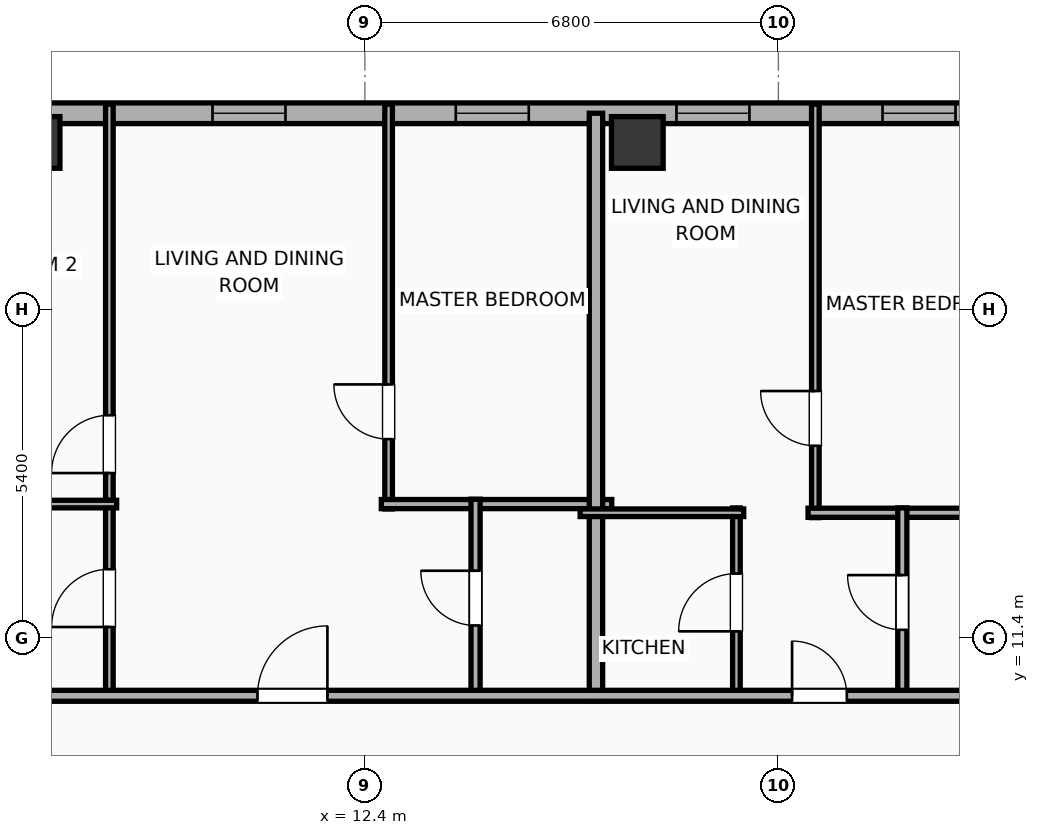
"""IFC4 building model, lengths in metres.
Left out: names, types, materials, properties, quantities, classifications, styles, units other than length and angle.
Written with IfcOpenShell. Run it as: python <this file> out.ifc"""

import sys

from ifc_helpers import new_model, si_unit, direction, frame, frame_2d, origin, origin_2d, place, context, subcontext, project, spatial, rectangle, hollow_rectangle, extrude, element, fill, save


model = new_model("IFC4")
c1 = context("Model", 3, precision=1e-05, world=origin(), true_north=direction((0.0, 1.0)))
c2 = subcontext(c1, "Body", "Model", "MODEL_VIEW")
j1 = project(units=[si_unit("LENGTHUNIT", "METRE"), si_unit("PLANEANGLEUNIT", "RADIAN")], contexts=[c1])
p1 = place(None, origin())
s1 = spatial("IfcSite", under=j1, at=p1, CompositionType="ELEMENT")
p2 = place(p1, origin())
s2 = spatial("IfcBuilding", under=s1, at=p2, CompositionType="ELEMENT")
p3 = place(p2, frame((0.0, 0.0, 239.2)))
s3 = spatial("IfcBuildingStorey", under=s2, at=p3, CompositionType="ELEMENT", Elevation=239.2)
for number, where, z_axis, x_axis in (
    (1, (16.88, 19.55, 0.0), (0.0, 0.0, 1.0), (1.0, 0.0, 0.0)),
    (2, (6.96, 19.55, 0.0), (0.0, 0.0, 1.0), (1.0, 0.0, 0.0)),
):
    element("IfcColumn", number, at=place(p3, frame(where, z_axis=z_axis, x_axis=x_axis)), inside=s3, PredefinedType="COLUMN", context=c2, shape_type="SweptSolid", body=[
        extrude(hollow_rectangle(XDim=0.85, YDim=0.85, WallThickness=0.028, at=origin_2d()), origin(), (0.0, 0.0, 1.0), 3.9),
    ])
p4 = place(p3, frame((-22.783, 20.03, 0.0), z_axis=(0.0, 0.0, 1.0), x_axis=(1.0, 0.0, 0.0)))
e3 = element("IfcWall", 3, at=p4, inside=s3, PredefinedType="ELEMENTEDWALL", context=c2, shape_type="SweptSolid", body=[
    extrude(rectangle(XDim=49.566, YDim=0.34, at=frame_2d((24.783, 0.0))), origin(), (0.0, 0.0, 1.0), 3.65),
])
p5 = place(p4, frame((6.211, 0.0, 0.75)))
e4 = element("IfcOpeningElement", 4, at=p5, cuts=e3, PredefinedType="OPENING", context=c2, shape_type="SweptSolid", body=[
    extrude(rectangle(XDim=2.4, YDim=2.1, at=frame_2d((1.2, 1.05))), frame((0.0, 0.18, 0.0), z_axis=(0.0, -1.0, 0.0), x_axis=(1.0, 0.0, 0.0)), (0.0, 0.0, 1.0), 0.36),
])
p6 = place(p4, frame((22.733, 0.0, 0.75)))
e5 = element("IfcOpeningElement", 5, at=p6, cuts=e3, PredefinedType="OPENING", context=c2, shape_type="SweptSolid", body=[
    extrude(rectangle(XDim=2.4, YDim=2.1, at=frame_2d((1.2, 1.05))), frame((0.0, 0.18, 0.0), z_axis=(0.0, -1.0, 0.0), x_axis=(1.0, 0.0, 0.0)), (0.0, 0.0, 1.0), 0.36),
])
p7 = place(p4, frame((1.132, 0.0, 0.75)))
e6 = element("IfcOpeningElement", 6, at=p7, cuts=e3, PredefinedType="OPENING", context=c2, shape_type="SweptSolid", body=[
    extrude(rectangle(XDim=1.2, YDim=2.05, at=frame_2d((0.6, 1.025))), frame((0.0, 0.18, 0.0), z_axis=(0.0, -1.0, 0.0), x_axis=(1.0, 0.0, 0.0)), (0.0, 0.0, 1.0), 0.36),
])
p8 = place(p4, frame((3.678, 0.0, 0.75)))
e7 = element("IfcOpeningElement", 7, at=p8, cuts=e3, PredefinedType="OPENING", context=c2, shape_type="SweptSolid", body=[
    extrude(rectangle(XDim=1.2, YDim=2.05, at=frame_2d((0.6, 1.025))), frame((0.0, 0.18, 0.0), z_axis=(0.0, -1.0, 0.0), x_axis=(1.0, 0.0, 0.0)), (0.0, 0.0, 1.0), 0.36),
])
p9 = place(p4, frame((14.804, 0.0, 0.75)))
e8 = element("IfcOpeningElement", 8, at=p9, cuts=e3, PredefinedType="OPENING", context=c2, shape_type="SweptSolid", body=[
    extrude(rectangle(XDim=1.2, YDim=2.05, at=frame_2d((0.6, 1.025))), frame((0.0, 0.18, 0.0), z_axis=(0.0, -1.0, 0.0), x_axis=(1.0, 0.0, 0.0)), (0.0, 0.0, 1.0), 0.36),
])
p10 = place(p4, frame((12.054, 0.0, 0.75)))
e9 = element("IfcOpeningElement", 9, at=p10, cuts=e3, PredefinedType="OPENING", context=c2, shape_type="SweptSolid", body=[
    extrude(rectangle(XDim=1.2, YDim=2.05, at=frame_2d((0.6, 1.025))), frame((0.0, 0.18, 0.0), z_axis=(0.0, -1.0, 0.0), x_axis=(1.0, 0.0, 0.0)), (0.0, 0.0, 1.0), 0.36),
])
p11 = place(p4, frame((17.933, 0.0, 0.75)))
e10 = element("IfcOpeningElement", 10, at=p11, cuts=e3, PredefinedType="OPENING", context=c2, shape_type="SweptSolid", body=[
    extrude(rectangle(XDim=1.2, YDim=2.05, at=frame_2d((0.6, 1.025))), frame((0.0, 0.18, 0.0), z_axis=(0.0, -1.0, 0.0), x_axis=(1.0, 0.0, 0.0)), (0.0, 0.0, 1.0), 0.36),
])
p12 = place(p4, frame((26.278, 0.0, 0.75)))
e11 = element("IfcOpeningElement", 11, at=p12, cuts=e3, PredefinedType="OPENING", context=c2, shape_type="SweptSolid", body=[
    extrude(rectangle(XDim=1.2, YDim=2.05, at=frame_2d((0.6, 1.025))), frame((0.0, 0.18, 0.0), z_axis=(0.0, -1.0, 0.0), x_axis=(1.0, 0.0, 0.0)), (0.0, 0.0, 1.0), 0.36),
])
p13 = place(p4, frame((32.677, 0.0, 0.75)))
e12 = element("IfcOpeningElement", 12, at=p13, cuts=e3, PredefinedType="OPENING", context=c2, shape_type="SweptSolid", body=[
    extrude(rectangle(XDim=1.2, YDim=2.05, at=frame_2d((0.6, 1.025))), frame((0.0, 0.18, 0.0), z_axis=(0.0, -1.0, 0.0), x_axis=(1.0, 0.0, 0.0)), (0.0, 0.0, 1.0), 0.36),
])
p14 = place(p4, frame((28.217, 0.0, 0.75)))
e13 = element("IfcOpeningElement", 13, at=p14, cuts=e3, PredefinedType="OPENING", context=c2, shape_type="SweptSolid", body=[
    extrude(rectangle(XDim=0.85, YDim=2.05, at=frame_2d((0.425, 1.025))), frame((0.0, 0.18, 0.0), z_axis=(0.0, -1.0, 0.0), x_axis=(1.0, 0.0, 0.0)), (0.0, 0.0, 1.0), 0.36),
])
p15 = place(p4, frame((36.678, 0.0, 0.75)))
e14 = element("IfcOpeningElement", 14, at=p15, cuts=e3, PredefinedType="OPENING", context=c2, shape_type="SweptSolid", body=[
    extrude(rectangle(XDim=1.2, YDim=2.05, at=frame_2d((0.6, 1.025))), frame((0.0, 0.18, 0.0), z_axis=(0.0, -1.0, 0.0), x_axis=(1.0, 0.0, 0.0)), (0.0, 0.0, 1.0), 0.36),
])
p16 = place(p4, frame((40.307, 0.0, 0.75)))
e15 = element("IfcOpeningElement", 15, at=p16, cuts=e3, PredefinedType="OPENING", context=c2, shape_type="SweptSolid", body=[
    extrude(rectangle(XDim=1.2, YDim=2.05, at=frame_2d((0.6, 1.025))), frame((0.0, 0.18, 0.0), z_axis=(0.0, -1.0, 0.0), x_axis=(1.0, 0.0, 0.0)), (0.0, 0.0, 1.0), 0.36),
])
p17 = place(p4, frame((43.696, 0.0, 0.75)))
e16 = element("IfcOpeningElement", 16, at=p17, cuts=e3, PredefinedType="OPENING", context=c2, shape_type="SweptSolid", body=[
    extrude(rectangle(XDim=1.2, YDim=2.05, at=frame_2d((0.6, 1.025))), frame((0.0, 0.18, 0.0), z_axis=(0.0, -1.0, 0.0), x_axis=(1.0, 0.0, 0.0)), (0.0, 0.0, 1.0), 0.36),
])
p18 = place(p4, frame((46.739, 0.0, 0.75)))
e17 = element("IfcOpeningElement", 17, at=p18, cuts=e3, PredefinedType="OPENING", context=c2, shape_type="SweptSolid", body=[
    extrude(rectangle(XDim=1.2, YDim=2.05, at=frame_2d((0.6, 1.025))), frame((0.0, 0.18, 0.0), z_axis=(0.0, -1.0, 0.0), x_axis=(1.0, 0.0, 0.0)), (0.0, 0.0, 1.0), 0.36),
])
p19 = place(p3, frame((8.198, 13.541, 0.0), z_axis=(0.0, 0.0, 1.0), x_axis=(0.0, 1.0, 0.0)))
e18 = element("IfcWall", 18, at=p19, inside=s3, PredefinedType="PARTITIONING", context=c2, shape_type="SweptSolid", body=[
    extrude(rectangle(XDim=6.639, YDim=0.125, at=frame_2d((3.32, 0.0))), origin(), (0.0, 0.0, 1.0), 3.65),
])
p20 = place(p19, frame((0.573, 0.0, 0.0)))
e19 = element("IfcOpeningElement", 19, at=p20, cuts=e18, PredefinedType="OPENING", context=c2, shape_type="SweptSolid", body=[
    extrude(rectangle(XDim=0.95, YDim=2.05, at=frame_2d((0.475, 1.025))), frame((0.0, 0.073, 0.0), z_axis=(0.0, -1.0, 0.0), x_axis=(1.0, 0.0, 0.0)), (0.0, 0.0, 1.0), 0.145),
])
p21 = place(p3, frame((12.79, 13.523, 0.0), z_axis=(0.0, 0.0, 1.0), x_axis=(0.0, 1.0, 0.0)))
e20 = element("IfcWall", 20, at=p21, inside=s3, PredefinedType="PARTITIONING", context=c2, shape_type="SweptSolid", body=[
    extrude(rectangle(XDim=6.657, YDim=0.125, at=frame_2d((3.329, 0.0))), origin(), (0.0, 0.0, 1.0), 3.65),
])
p22 = place(p21, frame((1.148, 0.0, 0.0)))
e21 = element("IfcOpeningElement", 21, at=p22, cuts=e20, PredefinedType="OPENING", context=c2, shape_type="SweptSolid", body=[
    extrude(rectangle(XDim=0.9, YDim=2.05, at=frame_2d((0.45, 1.025))), frame((0.0, 0.073, 0.0), z_axis=(0.0, -1.0, 0.0), x_axis=(1.0, 0.0, 0.0)), (0.0, 0.0, 1.0), 0.145),
])
p23 = place(p3, frame((12.67, 13.603, 0.0), z_axis=(0.0, 0.0, 1.0), x_axis=(1.0, 0.0, 0.0)))
e22 = element("IfcWall", 22, at=p23, inside=s3, PredefinedType="PLUMBINGWALL", context=c2, shape_type="SweptSolid", body=[
    extrude(rectangle(XDim=3.79, YDim=0.15, at=frame_2d((1.895, 0.0))), origin(), (0.0, 0.0, 1.0), 3.65),
])
p24 = place(p3, frame((8.198, 10.43, 0.0), z_axis=(0.0, 0.0, 1.0), x_axis=(0.0, 1.0, 0.0)))
e23 = element("IfcWall", 23, at=p24, inside=s3, PredefinedType="PARTITIONING", context=c2, shape_type="SweptSolid", body=[
    extrude(rectangle(XDim=3.236, YDim=0.125, at=frame_2d((1.618, 0.0))), origin(), (0.0, 0.0, 1.0), 3.65),
])
p25 = place(p24, frame((1.152, 0.0, 0.0)))
e24 = element("IfcOpeningElement", 24, at=p25, cuts=e23, PredefinedType="OPENING", context=c2, shape_type="SweptSolid", body=[
    extrude(rectangle(XDim=0.95, YDim=2.05, at=frame_2d((0.475, 1.025))), frame((0.0, 0.073, 0.0), z_axis=(0.0, -1.0, 0.0), x_axis=(1.0, 0.0, 0.0)), (0.0, 0.0, 1.0), 0.145),
])
p26 = place(p3, frame((4.94, 13.603, 0.0), z_axis=(0.0, 0.0, 1.0), x_axis=(1.0, 0.0, 0.0)))
e25 = element("IfcWall", 25, at=p26, inside=s3, PredefinedType="PARTITIONING", context=c2, shape_type="SweptSolid", body=[
    extrude(rectangle(XDim=3.378, YDim=0.125, at=frame_2d((1.689, 0.0))), origin(), (0.0, 0.0, 1.0), 3.65),
])
p27 = place(p3, frame((14.22, 10.43, 0.0), z_axis=(0.0, 0.0, 1.0), x_axis=(0.0, 1.0, 0.0)))
e26 = element("IfcWall", 26, at=p27, inside=s3, PredefinedType="PLUMBINGWALL", context=c2, shape_type="SweptSolid", body=[
    extrude(rectangle(XDim=3.253, YDim=0.15, at=frame_2d((1.626, 0.0))), origin(), (0.0, 0.0, 1.0), 3.65),
])
p28 = place(p27, frame((1.177, 0.0, 0.0)))
e27 = element("IfcOpeningElement", 27, at=p28, cuts=e26, PredefinedType="OPENING", context=c2, shape_type="SweptSolid", body=[
    extrude(rectangle(XDim=0.9, YDim=2.05, at=frame_2d((0.45, 1.025))), frame((0.0, 0.085, 0.0), z_axis=(0.0, -1.0, 0.0), x_axis=(1.0, 0.0, 0.0)), (0.0, 0.0, 1.0), 0.17),
])
p29 = place(p3, frame((16.2, 10.37, 0.0), z_axis=(0.0, 0.0, 1.0), x_axis=(0.0, 1.0, 0.0)))
e28 = element("IfcWall", 28, at=p29, inside=s3, PredefinedType="PARTITIONING", context=c2, shape_type="SweptSolid", body=[
    extrude(rectangle(XDim=9.66, YDim=0.22, at=frame_2d((4.83, 0.0))), origin(), (0.0, 0.0, 1.0), 3.09),
])
p30 = place(p3, frame((19.808, 13.38, 0.0), z_axis=(0.0, 0.0, 1.0), x_axis=(0.0, 1.0, 0.0)))
e29 = element("IfcWall", 29, at=p30, inside=s3, PredefinedType="PARTITIONING", context=c2, shape_type="SweptSolid", body=[
    extrude(rectangle(XDim=6.8, YDim=0.125, at=frame_2d((3.4, 0.0))), origin(), (0.0, 0.0, 1.0), 3.65),
])
p31 = place(p30, frame((1.182, 0.0, 0.0)))
e30 = element("IfcOpeningElement", 30, at=p31, cuts=e29, PredefinedType="OPENING", context=c2, shape_type="SweptSolid", body=[
    extrude(rectangle(XDim=0.9, YDim=2.05, at=frame_2d((0.45, 1.025))), frame((0.0, 0.073, 0.0), z_axis=(0.0, -1.0, 0.0), x_axis=(1.0, 0.0, 0.0)), (0.0, 0.0, 1.0), 0.145),
])
p32 = place(p3, frame((19.688, 13.46, 0.0), z_axis=(0.0, 0.0, 1.0), x_axis=(1.0, 0.0, 0.0)))
e31 = element("IfcWall", 31, at=p32, inside=s3, PredefinedType="PLUMBINGWALL", context=c2, shape_type="SweptSolid", body=[
    extrude(rectangle(XDim=3.79, YDim=0.15, at=frame_2d((1.895, 0.0))), origin(), (0.0, 0.0, 1.0), 3.65),
])
p33 = place(p3, frame((18.51, 10.43, 0.0), z_axis=(0.0, 0.0, 1.0), x_axis=(0.0, 1.0, 0.0)))
e32 = element("IfcWall", 32, at=p33, inside=s3, PredefinedType="PARTITIONING", context=c2, shape_type="SweptSolid", body=[
    extrude(rectangle(XDim=3.11, YDim=0.125, at=frame_2d((1.555, 0.0))), origin(), (0.0, 0.0, 1.0), 3.65),
])
p34 = place(p33, frame((1.08, 0.0, 0.0)))
e33 = element("IfcOpeningElement", 33, at=p34, cuts=e32, PredefinedType="OPENING", context=c2, shape_type="SweptSolid", body=[
    extrude(rectangle(XDim=0.95, YDim=2.05, at=frame_2d((0.475, 1.025))), frame((0.0, 0.073, 0.0), z_axis=(0.0, -1.0, 0.0), x_axis=(1.0, 0.0, 0.0)), (0.0, 0.0, 1.0), 0.145),
])
p35 = place(p3, frame((15.94, 13.46, 0.0), z_axis=(0.0, 0.0, 1.0), x_axis=(1.0, 0.0, 0.0)))
e34 = element("IfcWall", 34, at=p35, inside=s3, PredefinedType="PARTITIONING", context=c2, shape_type="SweptSolid", body=[
    extrude(rectangle(XDim=2.69, YDim=0.125, at=frame_2d((1.345, 0.0))), origin(), (0.0, 0.0, 1.0), 3.65),
])
p36 = place(p3, frame((21.238, 10.43, 0.0), z_axis=(0.0, 0.0, 1.0), x_axis=(0.0, 1.0, 0.0)))
e35 = element("IfcWall", 35, at=p36, inside=s3, PredefinedType="PLUMBINGWALL", context=c2, shape_type="SweptSolid", body=[
    extrude(rectangle(XDim=3.11, YDim=0.15, at=frame_2d((1.555, 0.0))), origin(), (0.0, 0.0, 1.0), 3.65),
])
p37 = place(p36, frame((1.105, 0.0, 0.0)))
e36 = element("IfcOpeningElement", 36, at=p37, cuts=e35, PredefinedType="OPENING", context=c2, shape_type="SweptSolid", body=[
    extrude(rectangle(XDim=0.9, YDim=2.05, at=frame_2d((0.45, 1.025))), frame((0.0, 0.085, 0.0), z_axis=(0.0, -1.0, 0.0), x_axis=(1.0, 0.0, 0.0)), (0.0, 0.0, 1.0), 0.17),
])
p38 = place(p3, frame((-26.23, 10.45, 0.0), z_axis=(0.0, 0.0, 1.0), x_axis=(1.0, 0.0, 0.0)))
e37 = element("IfcWall", 37, at=p38, inside=s3, PredefinedType="PARTITIONING", context=c2, shape_type="SweptSolid", body=[
    extrude(rectangle(XDim=56.46, YDim=0.18, at=frame_2d((28.23, 0.0))), origin(), (0.0, 0.0, 1.0), 3.65),
])
p39 = place(p38, frame((4.41, 0.0, 0.0)))
e38 = element("IfcOpeningElement", 38, at=p39, cuts=e37, PredefinedType="OPENING", context=c2, shape_type="SweptSolid", body=[
    extrude(rectangle(XDim=1.15, YDim=2.05, at=frame_2d((0.575, 1.025))), frame((0.0, 0.1, 0.0), z_axis=(0.0, -1.0, 0.0), x_axis=(1.0, 0.0, 0.0)), (0.0, 0.0, 1.0), 0.2),
])
p40 = place(p38, frame((11.943, 0.0, 0.0)))
e39 = element("IfcOpeningElement", 39, at=p40, cuts=e37, PredefinedType="OPENING", context=c2, shape_type="SweptSolid", body=[
    extrude(rectangle(XDim=0.9, YDim=2.05, at=frame_2d((0.45, 1.025))), frame((0.0, 0.1, 0.0), z_axis=(0.0, -1.0, 0.0), x_axis=(1.0, 0.0, 0.0)), (0.0, 0.0, 1.0), 0.2),
])
p41 = place(p38, frame((18.243, 0.0, 0.0)))
e40 = element("IfcOpeningElement", 40, at=p41, cuts=e37, PredefinedType="OPENING", context=c2, shape_type="SweptSolid", body=[
    extrude(rectangle(XDim=1.15, YDim=2.05, at=frame_2d((0.575, 1.025))), frame((0.0, 0.1, 0.0), z_axis=(0.0, -1.0, 0.0), x_axis=(1.0, 0.0, 0.0)), (0.0, 0.0, 1.0), 0.2),
])
p42 = place(p38, frame((22.941, 0.0, 0.0)))
e41 = element("IfcOpeningElement", 41, at=p42, cuts=e37, PredefinedType="OPENING", context=c2, shape_type="SweptSolid", body=[
    extrude(rectangle(XDim=0.9, YDim=2.05, at=frame_2d((0.45, 1.025))), frame((0.0, 0.1, 0.0), z_axis=(0.0, -1.0, 0.0), x_axis=(1.0, 0.0, 0.0)), (0.0, 0.0, 1.0), 0.2),
])
p43 = place(p38, frame((27.028, 0.0, 0.0)))
e42 = element("IfcOpeningElement", 42, at=p43, cuts=e37, PredefinedType="OPENING", context=c2, shape_type="SweptSolid", body=[
    extrude(rectangle(XDim=1.15, YDim=2.05, at=frame_2d((0.575, 1.025))), frame((0.0, 0.1, 0.0), z_axis=(0.0, -1.0, 0.0), x_axis=(1.0, 0.0, 0.0)), (0.0, 0.0, 1.0), 0.2),
])
p44 = place(p38, frame((36.864, 0.0, 0.0)))
e43 = element("IfcOpeningElement", 43, at=p44, cuts=e37, PredefinedType="OPENING", context=c2, shape_type="SweptSolid", body=[
    extrude(rectangle(XDim=1.15, YDim=2.05, at=frame_2d((0.575, 1.025))), frame((0.0, 0.1, 0.0), z_axis=(0.0, -1.0, 0.0), x_axis=(1.0, 0.0, 0.0)), (0.0, 0.0, 1.0), 0.2),
])
p45 = place(p38, frame((45.655, 0.0, 0.0)))
e44 = element("IfcOpeningElement", 44, at=p45, cuts=e37, PredefinedType="OPENING", context=c2, shape_type="SweptSolid", body=[
    extrude(rectangle(XDim=0.9, YDim=2.05, at=frame_2d((0.45, 1.025))), frame((0.0, 0.1, 0.0), z_axis=(0.0, -1.0, 0.0), x_axis=(1.0, 0.0, 0.0)), (0.0, 0.0, 1.0), 0.2),
])
p46 = place(p38, frame((52.576, 0.0, 0.0)))
e45 = element("IfcOpeningElement", 45, at=p46, cuts=e37, PredefinedType="OPENING", context=c2, shape_type="SweptSolid", body=[
    extrude(rectangle(XDim=1.15, YDim=2.05, at=frame_2d((0.575, 1.025))), frame((0.0, 0.1, 0.0), z_axis=(0.0, -1.0, 0.0), x_axis=(1.0, 0.0, 0.0)), (0.0, 0.0, 1.0), 0.2),
])
p47 = place(p13, origin())
e46 = element("IfcWindow", 46, at=p47, inside=s3, PartitioningType="SINGLE_PANEL", PredefinedType="WINDOW", context=c2, shape_type="SweptSolid", body=[
    extrude(rectangle(XDim=1.2, YDim=2.05, at=frame_2d((0.6, 1.025))), frame((0.0, 0.03, 0.0), z_axis=(0.0, -1.0, 0.0), x_axis=(1.0, 0.0, 0.0)), (0.0, 0.0, 1.0), 0.06),
])
fill(e12, e46)
p48 = place(p15, origin())
e47 = element("IfcWindow", 47, at=p48, inside=s3, PartitioningType="SINGLE_PANEL", PredefinedType="WINDOW", context=c2, shape_type="SweptSolid", body=[
    extrude(rectangle(XDim=1.2, YDim=2.05, at=frame_2d((0.6, 1.025))), frame((0.0, 0.03, 0.0), z_axis=(0.0, -1.0, 0.0), x_axis=(1.0, 0.0, 0.0)), (0.0, 0.0, 1.0), 0.06),
])
fill(e14, e47)
p49 = place(p16, origin())
e48 = element("IfcWindow", 48, at=p49, inside=s3, PartitioningType="SINGLE_PANEL", PredefinedType="WINDOW", context=c2, shape_type="SweptSolid", body=[
    extrude(rectangle(XDim=1.2, YDim=2.05, at=frame_2d((0.6, 1.025))), frame((0.0, 0.03, 0.0), z_axis=(0.0, -1.0, 0.0), x_axis=(1.0, 0.0, 0.0)), (0.0, 0.0, 1.0), 0.06),
])
fill(e15, e48)
p50 = place(p17, origin())
e49 = element("IfcWindow", 49, at=p50, inside=s3, PartitioningType="SINGLE_PANEL", PredefinedType="WINDOW", context=c2, shape_type="SweptSolid", body=[
    extrude(rectangle(XDim=1.2, YDim=2.05, at=frame_2d((0.6, 1.025))), frame((0.0, 0.03, 0.0), z_axis=(0.0, -1.0, 0.0), x_axis=(1.0, 0.0, 0.0)), (0.0, 0.0, 1.0), 0.06),
])
fill(e16, e49)
p51 = place(p20, origin())
e50 = element("IfcDoor", 50, at=p51, inside=s3, OperationType="SINGLE_SWING_LEFT", PredefinedType="DOOR", context=c2, shape_type="SweptSolid", body=[
    extrude(rectangle(XDim=0.95, YDim=2.05, at=frame_2d((0.475, 1.025))), frame((0.0, 0.025, 0.0), z_axis=(0.0, -1.0, 0.0), x_axis=(1.0, 0.0, 0.0)), (0.0, 0.0, 1.0), 0.05),
])
fill(e19, e50)
p52 = place(p22, origin())
e51 = element("IfcDoor", 51, at=p52, inside=s3, OperationType="SINGLE_SWING_RIGHT", PredefinedType="DOOR", context=c2, shape_type="SweptSolid", body=[
    extrude(rectangle(XDim=0.9, YDim=2.05, at=frame_2d((0.45, 1.025))), frame((0.0, 0.025, 0.0), z_axis=(0.0, -1.0, 0.0), x_axis=(1.0, 0.0, 0.0)), (0.0, 0.0, 1.0), 0.05),
])
fill(e21, e51)
p53 = place(p25, origin())
e52 = element("IfcDoor", 52, at=p53, inside=s3, OperationType="SINGLE_SWING_LEFT", PredefinedType="DOOR", context=c2, shape_type="SweptSolid", body=[
    extrude(rectangle(XDim=0.95, YDim=2.05, at=frame_2d((0.475, 1.025))), frame((0.0, 0.025, 0.0), z_axis=(0.0, -1.0, 0.0), x_axis=(1.0, 0.0, 0.0)), (0.0, 0.0, 1.0), 0.05),
])
fill(e24, e52)
p54 = place(p28, origin())
e53 = element("IfcDoor", 53, at=p54, inside=s3, OperationType="SINGLE_SWING_RIGHT", PredefinedType="DOOR", context=c2, shape_type="SweptSolid", body=[
    extrude(rectangle(XDim=0.9, YDim=2.05, at=frame_2d((0.45, 1.025))), frame((0.0, 0.025, 0.0), z_axis=(0.0, -1.0, 0.0), x_axis=(1.0, 0.0, 0.0)), (0.0, 0.0, 1.0), 0.05),
])
fill(e27, e53)
p55 = place(p31, origin())
e54 = element("IfcDoor", 54, at=p55, inside=s3, OperationType="SINGLE_SWING_RIGHT", PredefinedType="DOOR", context=c2, shape_type="SweptSolid", body=[
    extrude(rectangle(XDim=0.9, YDim=2.05, at=frame_2d((0.45, 1.025))), frame((0.0, 0.025, 0.0), z_axis=(0.0, -1.0, 0.0), x_axis=(1.0, 0.0, 0.0)), (0.0, 0.0, 1.0), 0.05),
])
fill(e30, e54)
p56 = place(p34, origin())
e55 = element("IfcDoor", 55, at=p56, inside=s3, OperationType="SINGLE_SWING_LEFT", PredefinedType="DOOR", context=c2, shape_type="SweptSolid", body=[
    extrude(rectangle(XDim=0.95, YDim=2.05, at=frame_2d((0.475, 1.025))), frame((0.0, 0.025, 0.0), z_axis=(0.0, -1.0, 0.0), x_axis=(1.0, 0.0, 0.0)), (0.0, 0.0, 1.0), 0.05),
])
fill(e33, e55)
p57 = place(p37, origin())
e56 = element("IfcDoor", 56, at=p57, inside=s3, OperationType="SINGLE_SWING_RIGHT", PredefinedType="DOOR", context=c2, shape_type="SweptSolid", body=[
    extrude(rectangle(XDim=0.9, YDim=2.05, at=frame_2d((0.45, 1.025))), frame((0.0, 0.025, 0.0), z_axis=(0.0, -1.0, 0.0), x_axis=(1.0, 0.0, 0.0)), (0.0, 0.0, 1.0), 0.05),
])
fill(e36, e56)
p58 = place(p44, origin())
e57 = element("IfcDoor", 57, at=p58, inside=s3, OperationType="SINGLE_SWING_RIGHT", PredefinedType="DOOR", context=c2, shape_type="SweptSolid", body=[
    extrude(rectangle(XDim=1.15, YDim=2.05, at=frame_2d((0.575, 1.025))), frame((0.0, 0.025, 0.0), z_axis=(0.0, -1.0, 0.0), x_axis=(1.0, 0.0, 0.0)), (0.0, 0.0, 1.0), 0.05),
])
fill(e43, e57)
p59 = place(p45, origin())
e58 = element("IfcDoor", 58, at=p59, inside=s3, OperationType="SINGLE_SWING_LEFT", PredefinedType="DOOR", context=c2, shape_type="SweptSolid", body=[
    extrude(rectangle(XDim=0.9, YDim=2.05, at=frame_2d((0.45, 1.025))), frame((0.0, 0.025, 0.0), z_axis=(0.0, -1.0, 0.0), x_axis=(1.0, 0.0, 0.0)), (0.0, 0.0, 1.0), 0.05),
])
fill(e44, e58)
save(model, sys.argv[1])
